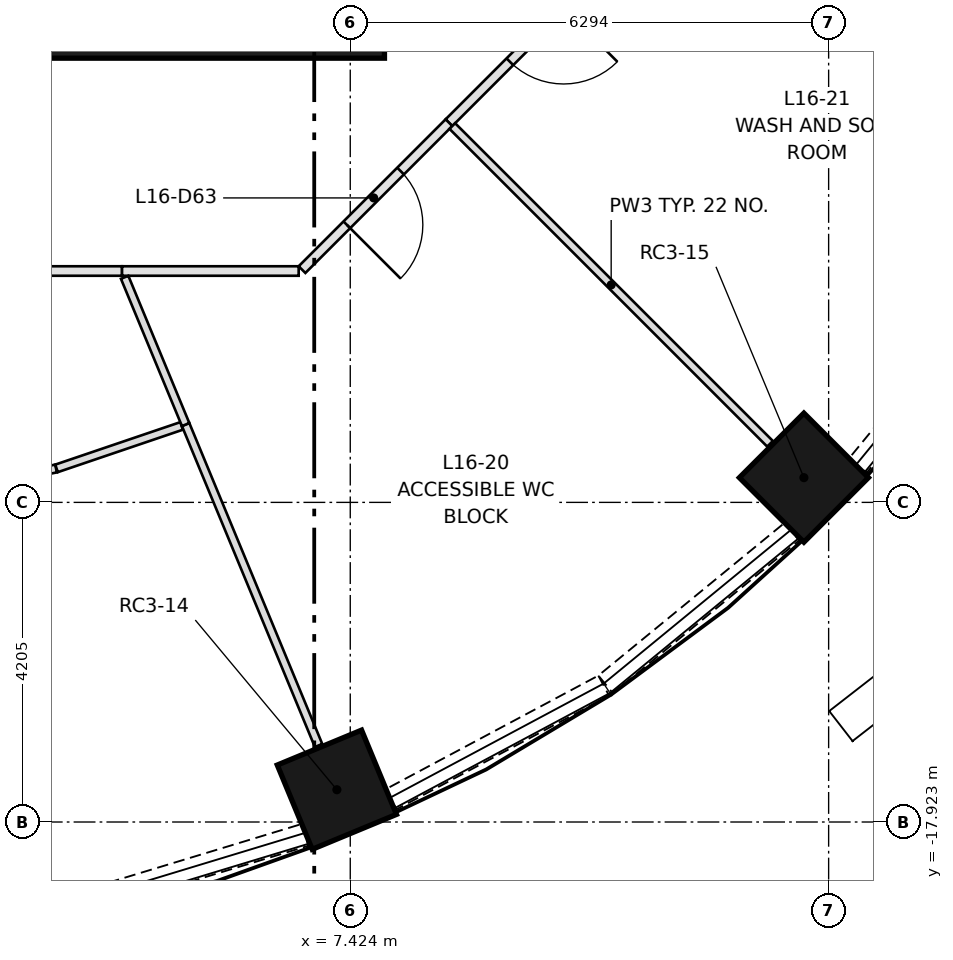
"""IFC4 building model, lengths in metres.
Left out: names, types, materials, properties, quantities, classifications, styles, units other than length and angle.
Written with IfcOpenShell. Run it as: python <this file> out.ifc"""

import sys

from ifc_helpers import new_model, si_unit, direction, frame, frame_2d, origin, origin_2d, place, context, subcontext, project, spatial, rectangle, extrude, element, fill, save


model = new_model("IFC4")
c1 = context("Model", 3, precision=1e-05, world=origin(), true_north=direction((0.0, 1.0)))
c2 = subcontext(c1, "Body", "Model", "MODEL_VIEW")
j1 = project(units=[si_unit("LENGTHUNIT", "METRE"), si_unit("PLANEANGLEUNIT", "RADIAN")], contexts=[c1])
p1 = place(None, origin())
s1 = spatial("IfcSite", under=j1, at=p1, CompositionType="ELEMENT")
p2 = place(p1, origin())
s2 = spatial("IfcBuilding", under=s1, at=p2, CompositionType="ELEMENT")
p3 = place(p2, frame((0.0, 0.0, 62.7)))
s3 = spatial("IfcBuildingStorey", under=s2, at=p3, CompositionType="ELEMENT", Elevation=62.7)
for number, where, z_axis, x_axis in (
    (1, (7.248, -17.498, 0.0), (0.0, 0.0, 1.0), (0.383, -0.924, 0.0)),
    (2, (13.393, -13.393, 0.0), (0.0, 0.0, 1.0), (0.707, -0.707, 0.0)),
):
    element("IfcColumn", number, at=place(p3, frame(where, z_axis=z_axis, x_axis=x_axis)), inside=s3, PredefinedType="COLUMN", context=c2, shape_type="SweptSolid", body=[
        extrude(rectangle(XDim=1.2, YDim=1.2, at=origin_2d()), origin(), (0.0, 0.0, 1.0), 3.65),
    ])
p4 = place(p3, frame((-7.874, -7.424, 0.0), z_axis=(0.0, 0.0, 1.0), x_axis=(1.0, 0.0, 0.0)))
e3 = element("IfcWall", 3, at=p4, inside=s3, PredefinedType="SHEAR", context=c2, shape_type="SweptSolid", body=[
    extrude(rectangle(XDim=15.748, YDim=0.9, at=frame_2d((7.874, 0.0))), origin(), (0.0, 0.0, 1.0), 3.65),
])
p5 = place(p3, frame((3.797, -19.013, 0.0), z_axis=(0.0, 0.0, 1.0), x_axis=(0.956888224489, 0.290456409527, 0.0)))
e4 = element("IfcWall", 4, at=p5, inside=s3, PredefinedType="SOLIDWALL", context=c2, shape_type="SweptSolid", body=[
    extrude(rectangle(XDim=3.169, YDim=0.3, at=frame_2d((1.584, 0.0))), origin(), (0.0, 0.0, 1.0), 0.9),
])
p6 = place(p3, frame((7.963, -17.623, 0.0), z_axis=(0.0, 0.0, 1.0), x_axis=(0.882007292685, 0.47123575379, 0.0)))
e5 = element("IfcWall", 5, at=p6, inside=s3, PredefinedType="SOLIDWALL", context=c2, shape_type="SweptSolid", body=[
    extrude(rectangle(XDim=3.17, YDim=0.3, at=frame_2d((1.585, 0.0))), origin(), (0.0, 0.0, 1.0), 0.9),
])
for number, where, z_axis, x_axis in (
    (6, (10.784, -16.113, 0.0), (0.0, 0.0, 1.0), (0.773, 0.634, 0.0)),
    (7, (14.103, -13.234, 0.0), (0.0, 0.0, 1.0), (0.634, 0.773, 0.0)),
):
    element("IfcWall", number, at=place(p3, frame(where, z_axis=z_axis, x_axis=x_axis)), inside=s3, PredefinedType="SOLIDWALL", context=c2, shape_type="SweptSolid", body=[
        extrude(rectangle(XDim=3.169, YDim=0.3, at=frame_2d((1.585, 0.0))), origin(), (0.0, 0.0, 1.0), 0.9),
    ])
p7 = place(p3, frame((10.656, -6.789, 0.0), z_axis=(0.0, 0.0, 1.0), x_axis=(-0.707151428813, -0.707062130741, 0.0)))
e8 = element("IfcWall", 8, at=p7, inside=s3, PredefinedType="PARTITIONING", context=c2, shape_type="SweptSolid", body=[
    extrude(rectangle(XDim=2.734, YDim=0.125, at=frame_2d((1.367, 0.0))), origin(), (0.0, 0.0, 1.0), 3.3),
])
p8 = place(p7, frame((0.6, 0.0, 0.0)))
e9 = element("IfcOpeningElement", 9, at=p8, cuts=e8, PredefinedType="OPENING", context=c2, shape_type="SweptSolid", body=[
    extrude(rectangle(XDim=1.0, YDim=2.1, at=frame_2d((0.5, 1.05))), frame((0.0, 0.073, 0.0), z_axis=(0.0, -1.0, 0.0), x_axis=(1.0, 0.0, 0.0)), (0.0, 0.0, 1.0), 0.145),
])
p9 = place(p3, frame((4.421, -10.674, 0.0), z_axis=(0.0, 0.0, 1.0), x_axis=(-1.0, 0.0, 0.0)))
e10 = element("IfcWall", 10, at=p9, inside=s3, PredefinedType="PARTITIONING", context=c2, shape_type="SweptSolid", body=[
    extrude(rectangle(XDim=4.421, YDim=0.125, at=frame_2d((2.211, 0.0))), origin(), (0.0, 0.0, 1.0), 3.3),
])
p10 = place(p9, frame((1.7, 0.0, 0.0)))
e11 = element("IfcOpeningElement", 11, at=p10, cuts=e10, PredefinedType="OPENING", context=c2, shape_type="SweptSolid", body=[
    extrude(rectangle(XDim=1.0, YDim=2.1, at=frame_2d((0.5, 1.05))), frame((0.0, 0.073, 0.0), z_axis=(0.0, -1.0, 0.0), x_axis=(1.0, 0.0, 0.0)), (0.0, 0.0, 1.0), 0.145),
])
p11 = place(p3, frame((6.745, -10.674, 0.0), z_axis=(0.0, 0.0, 1.0), x_axis=(-1.0, 0.0, 0.0)))
e12 = element("IfcWall", 12, at=p11, inside=s3, PredefinedType="PARTITIONING", context=c2, shape_type="SweptSolid", body=[
    extrude(rectangle(XDim=2.324, YDim=0.125, at=frame_2d((1.162, 0.0))), origin(), (0.0, 0.0, 1.0), 3.3),
])
p12 = place(p3, frame((8.722, -8.722, 0.0), z_axis=(0.0, 0.0, 1.0), x_axis=(-0.707062130741, -0.707151428813, 0.0)))
e13 = element("IfcWall", 13, at=p12, inside=s3, PredefinedType="PARTITIONING", context=c2, shape_type="SweptSolid", body=[
    extrude(rectangle(XDim=2.734, YDim=0.125, at=frame_2d((1.367, 0.0))), origin(), (0.0, 0.0, 1.0), 3.3),
])
p13 = place(p12, frame((0.9, 0.0, 0.0)))
e14 = element("IfcOpeningElement", 14, at=p13, cuts=e13, PredefinedType="OPENING", context=c2, shape_type="SweptSolid", body=[
    extrude(rectangle(XDim=1.0, YDim=2.1, at=frame_2d((0.5, 1.05))), frame((0.0, 0.073, 0.0), z_axis=(0.0, -1.0, 0.0), x_axis=(1.0, 0.0, 0.0)), (0.0, 0.0, 1.0), 0.145),
])
p14 = place(p3, frame((1.797, -13.622, 0.0), z_axis=(0.0, 0.0, 1.0), x_axis=(0.980774260843, 0.195145712912, 0.0)))
e15 = element("IfcWall", 15, at=p14, inside=s3, PredefinedType="PARTITIONING", context=c2, shape_type="SweptSolid", body=[
    extrude(rectangle(XDim=1.79, YDim=0.105, at=frame_2d((0.895, 0.0))), origin(), (0.0, 0.0, 1.0), 3.3),
])
p15 = place(p3, frame((3.56, -13.271, 0.0), z_axis=(0.0, 0.0, 1.0), x_axis=(0.946926781261, 0.321449328713, 0.0)))
e16 = element("IfcWall", 16, at=p15, inside=s3, PredefinedType="PARTITIONING", context=c2, shape_type="SweptSolid", body=[
    extrude(rectangle(XDim=1.738, YDim=0.105, at=frame_2d((0.869, 0.0))), origin(), (0.0, 0.0, 1.0), 3.3),
])
p16 = place(p3, frame((5.258, -12.694, 0.0), z_axis=(0.0, 0.0, 1.0), x_axis=(0.382710364739, -0.923868376297, 0.0)))
e17 = element("IfcWall", 17, at=p16, inside=s3, PredefinedType="PARTITIONING", context=c2, shape_type="SweptSolid", body=[
    extrude(rectangle(XDim=4.57, YDim=0.105, at=frame_2d((2.285, 0.0))), origin(), (0.0, 0.0, 1.0), 3.3),
])
p17 = place(p3, frame((4.456, -10.757, 0.0), z_axis=(0.0, 0.0, 1.0), x_axis=(0.382663674763, -0.92388771613, 0.0)))
e18 = element("IfcWall", 18, at=p17, inside=s3, PredefinedType="PARTITIONING", context=c2, shape_type="SweptSolid", body=[
    extrude(rectangle(XDim=2.097, YDim=0.105, at=frame_2d((1.049, 0.0))), origin(), (0.0, 0.0, 1.0), 3.3),
])
p18 = place(p3, frame((8.767, -8.767, 0.0), z_axis=(0.0, 0.0, 1.0), x_axis=(0.707106781187, -0.707106781187, 0.0)))
e19 = element("IfcWall", 19, at=p18, inside=s3, PredefinedType="PARTITIONING", context=c2, shape_type="SweptSolid", body=[
    extrude(rectangle(XDim=5.912, YDim=0.105, at=frame_2d((2.956, 0.0))), origin(), (0.0, 0.0, 1.0), 3.3),
])
p19 = place(p8, origin())
e20 = element("IfcDoor", 20, at=p19, inside=s3, OperationType="SINGLE_SWING_LEFT", PredefinedType="DOOR", context=c2, shape_type="SweptSolid", body=[
    extrude(rectangle(XDim=1.0, YDim=2.1, at=frame_2d((0.5, 1.05))), frame((0.0, 0.025, 0.0), z_axis=(0.0, -1.0, 0.0), x_axis=(1.0, 0.0, 0.0)), (0.0, 0.0, 1.0), 0.05),
])
fill(e9, e20)
p20 = place(p13, origin())
e21 = element("IfcDoor", 21, at=p20, inside=s3, OperationType="SINGLE_SWING_RIGHT", PredefinedType="DOOR", context=c2, shape_type="SweptSolid", body=[
    extrude(rectangle(XDim=1.0, YDim=2.1, at=frame_2d((0.5, 1.05))), frame((0.0, 0.025, 0.0), z_axis=(0.0, -1.0, 0.0), x_axis=(1.0, 0.0, 0.0)), (0.0, 0.0, 1.0), 0.05),
])
fill(e14, e21)
save(model, sys.argv[1])
